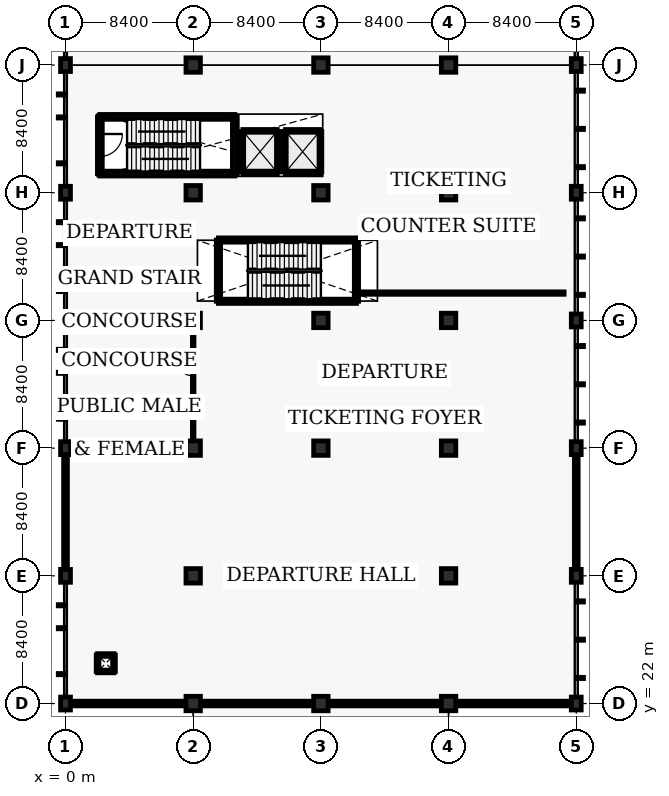
"""IFC4 building model, lengths in metres.
Left out: names, types, materials, properties, quantities, classifications, styles, units other than length and angle.
Written with IfcOpenShell. Run it as: python <this file> out.ifc"""

import sys

from ifc_helpers import new_model, si_unit, direction, frame, frame_2d, origin, origin_2d, place, context, subcontext, project, spatial, rectangle, circle, extrude, element, fill, save


model = new_model("IFC4")
c1 = context("Model", 3, precision=1e-05, world=origin(), true_north=direction((0.0, 1.0)))
c2 = subcontext(c1, "Body", "Model", "MODEL_VIEW")
j1 = project(units=[si_unit("LENGTHUNIT", "METRE"), si_unit("PLANEANGLEUNIT", "RADIAN")], contexts=[c1])
p1 = place(None, origin())
s1 = spatial("IfcSite", under=j1, at=p1, CompositionType="ELEMENT")
p2 = place(p1, origin())
s2 = spatial("IfcBuilding", under=s1, at=p2, CompositionType="ELEMENT")
p3 = place(p2, origin())
s3 = spatial("IfcBuildingStorey", under=s2, at=p3, CompositionType="ELEMENT", Elevation=0.0)
for number, where, z_axis, x_axis in (
    (1, (0.0, 22.0, -0.46), (0.0, 0.0, 1.0), (1.0, 0.0, 0.0)),
    (2, (0.0, 30.4, -0.46), (0.0, 0.0, 1.0), (1.0, 0.0, 0.0)),
    (3, (0.0, 38.8, -0.46), (0.0, 0.0, 1.0), (1.0, 0.0, 0.0)),
    (4, (0.0, 47.2, -0.46), (0.0, 0.0, 1.0), (1.0, 0.0, 0.0)),
    (5, (0.0, 55.6, -0.46), (0.0, 0.0, 1.0), (1.0, 0.0, 0.0)),
    (6, (0.0, 64.0, -0.46), (0.0, 0.0, 1.0), (1.0, 0.0, 0.0)),
):
    element("IfcColumn", number, at=place(p3, frame(where, z_axis=z_axis, x_axis=x_axis)), inside=s3, PredefinedType="COLUMN", context=c2, shape_type="SweptSolid", body=[
        extrude(rectangle(XDim=0.65, YDim=0.85, at=origin_2d()), origin(), (0.0, 0.0, 1.0), 5.9),
    ])
p4 = place(p3, frame((8.4, 22.0, -0.46), z_axis=(0.0, 0.0, 1.0), x_axis=(1.0, 0.0, 0.0)))
e7 = element("IfcColumn", 7, at=p4, inside=s3, PredefinedType="COLUMN", context=c2, shape_type="SweptSolid", body=[
    extrude(circle(Radius=0.475, at=origin_2d()), origin(), (0.0, 0.0, 1.0), 11.339),
])
p5 = place(p3, frame((8.4, 30.4, -0.46), z_axis=(0.0, 0.0, 1.0), x_axis=(1.0, 0.0, 0.0)))
e8 = element("IfcColumn", 8, at=p5, inside=s3, PredefinedType="COLUMN", context=c2, shape_type="SweptSolid", body=[
    extrude(circle(Radius=0.475, at=origin_2d()), origin(), (0.0, 0.0, 1.0), 12.053),
])
p6 = place(p3, frame((8.4, 38.8, -0.46), z_axis=(0.0, 0.0, 1.0), x_axis=(1.0, 0.0, 0.0)))
e9 = element("IfcColumn", 9, at=p6, inside=s3, PredefinedType="COLUMN", context=c2, shape_type="SweptSolid", body=[
    extrude(circle(Radius=0.475, at=origin_2d()), origin(), (0.0, 0.0, 1.0), 12.768),
])
for number, where, z_axis, x_axis in (
    (10, (8.4, 47.2, -0.46), (0.0, 0.0, 1.0), (1.0, 0.0, 0.0)),
    (11, (8.4, 55.6, -0.46), (0.0, 0.0, 1.0), (1.0, 0.0, 0.0)),
    (12, (8.4, 64.0, -0.46), (0.0, 0.0, 1.0), (1.0, 0.0, 0.0)),
):
    element("IfcColumn", number, at=place(p3, frame(where, z_axis=z_axis, x_axis=x_axis)), inside=s3, PredefinedType="COLUMN", context=c2, shape_type="SweptSolid", body=[
        extrude(circle(Radius=0.475, at=origin_2d()), origin(), (0.0, 0.0, 1.0), 5.9),
    ])
p7 = place(p3, frame((16.8, 22.0, -0.46), z_axis=(0.0, 0.0, 1.0), x_axis=(1.0, 0.0, 0.0)))
e13 = element("IfcColumn", 13, at=p7, inside=s3, PredefinedType="COLUMN", context=c2, shape_type="SweptSolid", body=[
    extrude(circle(Radius=0.475, at=origin_2d()), origin(), (0.0, 0.0, 1.0), 13.817),
])
p8 = place(p3, frame((16.8, 30.4, -0.46), z_axis=(0.0, 0.0, 1.0), x_axis=(1.0, 0.0, 0.0)))
e14 = element("IfcColumn", 14, at=p8, inside=s3, PredefinedType="COLUMN", context=c2, shape_type="SweptSolid", body=[
    extrude(circle(Radius=0.475, at=origin_2d()), origin(), (0.0, 0.0, 1.0), 14.531),
])
p9 = place(p3, frame((16.8, 38.8, -0.46), z_axis=(0.0, 0.0, 1.0), x_axis=(1.0, 0.0, 0.0)))
e15 = element("IfcColumn", 15, at=p9, inside=s3, PredefinedType="COLUMN", context=c2, shape_type="SweptSolid", body=[
    extrude(circle(Radius=0.475, at=origin_2d()), origin(), (0.0, 0.0, 1.0), 15.246),
])
for number, where, z_axis, x_axis in (
    (16, (16.8, 47.2, -0.46), (0.0, 0.0, 1.0), (1.0, 0.0, 0.0)),
    (17, (16.8, 55.6, -0.46), (0.0, 0.0, 1.0), (1.0, 0.0, 0.0)),
    (18, (16.8, 64.0, -0.46), (0.0, 0.0, 1.0), (1.0, 0.0, 0.0)),
):
    element("IfcColumn", number, at=place(p3, frame(where, z_axis=z_axis, x_axis=x_axis)), inside=s3, PredefinedType="COLUMN", context=c2, shape_type="SweptSolid", body=[
        extrude(circle(Radius=0.475, at=origin_2d()), origin(), (0.0, 0.0, 1.0), 5.9),
    ])
p10 = place(p3, frame((25.2, 22.0, -0.46), z_axis=(0.0, 0.0, 1.0), x_axis=(1.0, 0.0, 0.0)))
e19 = element("IfcColumn", 19, at=p10, inside=s3, PredefinedType="COLUMN", context=c2, shape_type="SweptSolid", body=[
    extrude(circle(Radius=0.475, at=origin_2d()), origin(), (0.0, 0.0, 1.0), 11.339),
])
p11 = place(p3, frame((25.2, 30.4, -0.46), z_axis=(0.0, 0.0, 1.0), x_axis=(1.0, 0.0, 0.0)))
e20 = element("IfcColumn", 20, at=p11, inside=s3, PredefinedType="COLUMN", context=c2, shape_type="SweptSolid", body=[
    extrude(circle(Radius=0.475, at=origin_2d()), origin(), (0.0, 0.0, 1.0), 12.053),
])
p12 = place(p3, frame((25.2, 38.8, -0.46), z_axis=(0.0, 0.0, 1.0), x_axis=(1.0, 0.0, 0.0)))
e21 = element("IfcColumn", 21, at=p12, inside=s3, PredefinedType="COLUMN", context=c2, shape_type="SweptSolid", body=[
    extrude(circle(Radius=0.475, at=origin_2d()), origin(), (0.0, 0.0, 1.0), 12.768),
])
for number, where, z_axis, x_axis in (
    (22, (25.2, 47.2, -0.46), (0.0, 0.0, 1.0), (1.0, 0.0, 0.0)),
    (23, (25.2, 55.6, -0.46), (0.0, 0.0, 1.0), (1.0, 0.0, 0.0)),
    (24, (25.2, 64.0, -0.46), (0.0, 0.0, 1.0), (1.0, 0.0, 0.0)),
):
    element("IfcColumn", number, at=place(p3, frame(where, z_axis=z_axis, x_axis=x_axis)), inside=s3, PredefinedType="COLUMN", context=c2, shape_type="SweptSolid", body=[
        extrude(circle(Radius=0.475, at=origin_2d()), origin(), (0.0, 0.0, 1.0), 5.9),
    ])
for number, where, z_axis, x_axis in (
    (25, (33.6, 22.0, -0.46), (0.0, 0.0, 1.0), (1.0, 0.0, 0.0)),
    (26, (33.6, 30.4, -0.46), (0.0, 0.0, 1.0), (1.0, 0.0, 0.0)),
    (27, (33.6, 38.8, -0.46), (0.0, 0.0, 1.0), (1.0, 0.0, 0.0)),
    (28, (33.6, 47.2, -0.46), (0.0, 0.0, 1.0), (1.0, 0.0, 0.0)),
    (29, (33.6, 55.6, -0.46), (0.0, 0.0, 1.0), (1.0, 0.0, 0.0)),
    (30, (33.6, 64.0, -0.46), (0.0, 0.0, 1.0), (1.0, 0.0, 0.0)),
):
    element("IfcColumn", number, at=place(p3, frame(where, z_axis=z_axis, x_axis=x_axis)), inside=s3, PredefinedType="COLUMN", context=c2, shape_type="SweptSolid", body=[
        extrude(rectangle(XDim=0.65, YDim=0.85, at=origin_2d()), origin(), (0.0, 0.0, 1.0), 5.9),
    ])
p13 = place(p3, frame((0.325, 22.0, 0.0), z_axis=(0.0, 0.0, 1.0), x_axis=(1.0, 0.0, 0.0)))
e31 = element("IfcWall", 31, at=p13, inside=s3, PredefinedType="SOLIDWALL", context=c2, shape_type="SweptSolid", body=[
    extrude(rectangle(XDim=7.6, YDim=0.31, at=frame_2d((3.8, 0.0))), origin(), (0.0, 0.0, 1.0), 3.85),
])
p14 = place(p13, frame((2.765, 0.0, 0.0)))
e32 = element("IfcOpeningElement", 32, at=p14, cuts=e31, PredefinedType="OPENING", context=c2, shape_type="SweptSolid", body=[
    extrude(rectangle(XDim=2.2, YDim=2.35, at=frame_2d((1.1, 1.175))), frame((0.0, 0.165, 0.0), z_axis=(0.0, -1.0, 0.0), x_axis=(1.0, 0.0, 0.0)), (0.0, 0.0, 1.0), 0.33),
])
p15 = place(p3, frame((8.875, 22.0, 0.0), z_axis=(0.0, 0.0, 1.0), x_axis=(1.0, 0.0, 0.0)))
e33 = element("IfcWall", 33, at=p15, inside=s3, PredefinedType="SOLIDWALL", context=c2, shape_type="SweptSolid", body=[
    extrude(rectangle(XDim=7.45, YDim=0.31, at=frame_2d((3.725, 0.0))), origin(), (0.0, 0.0, 1.0), 3.85),
])
p16 = place(p15, frame((2.615, 0.0, 0.0)))
e34 = element("IfcOpeningElement", 34, at=p16, cuts=e33, PredefinedType="OPENING", context=c2, shape_type="SweptSolid", body=[
    extrude(rectangle(XDim=2.4, YDim=2.35, at=frame_2d((1.2, 1.175))), frame((0.0, 0.165, 0.0), z_axis=(0.0, -1.0, 0.0), x_axis=(1.0, 0.0, 0.0)), (0.0, 0.0, 1.0), 0.33),
])
p17 = place(p3, frame((17.275, 22.0, 0.0), z_axis=(0.0, 0.0, 1.0), x_axis=(1.0, 0.0, 0.0)))
e35 = element("IfcWall", 35, at=p17, inside=s3, PredefinedType="SOLIDWALL", context=c2, shape_type="SweptSolid", body=[
    extrude(rectangle(XDim=7.45, YDim=0.31, at=frame_2d((3.725, 0.0))), origin(), (0.0, 0.0, 1.0), 3.85),
])
p18 = place(p17, frame((2.615, 0.0, 0.0)))
e36 = element("IfcOpeningElement", 36, at=p18, cuts=e35, PredefinedType="OPENING", context=c2, shape_type="SweptSolid", body=[
    extrude(rectangle(XDim=2.4, YDim=2.35, at=frame_2d((1.2, 1.175))), frame((0.0, 0.165, 0.0), z_axis=(0.0, -1.0, 0.0), x_axis=(1.0, 0.0, 0.0)), (0.0, 0.0, 1.0), 0.33),
])
p19 = place(p3, frame((25.675, 22.0, 0.0), z_axis=(0.0, 0.0, 1.0), x_axis=(1.0, 0.0, 0.0)))
e37 = element("IfcWall", 37, at=p19, inside=s3, PredefinedType="SOLIDWALL", context=c2, shape_type="SweptSolid", body=[
    extrude(rectangle(XDim=7.6, YDim=0.31, at=frame_2d((3.8, 0.0))), origin(), (0.0, 0.0, 1.0), 3.85),
])
p20 = place(p19, frame((2.615, 0.0, 0.0)))
e38 = element("IfcOpeningElement", 38, at=p20, cuts=e37, PredefinedType="OPENING", context=c2, shape_type="SweptSolid", body=[
    extrude(rectangle(XDim=2.2, YDim=2.35, at=frame_2d((1.1, 1.175))), frame((0.0, 0.165, 0.0), z_axis=(0.0, -1.0, 0.0), x_axis=(1.0, 0.0, 0.0)), (0.0, 0.0, 1.0), 0.33),
])
for number, where, z_axis, x_axis in (
    (39, (0.0, 38.375, 0.0), (0.0, 0.0, 1.0), (0.0, -1.0, 0.0)),
    (40, (33.6, 30.825, 0.0), (0.0, 0.0, 1.0), (0.0, 1.0, 0.0)),
):
    element("IfcWall", number, at=place(p3, frame(where, z_axis=z_axis, x_axis=x_axis)), inside=s3, PredefinedType="SOLIDWALL", context=c2, shape_type="SweptSolid", body=[
        extrude(rectangle(XDim=7.55, YDim=0.25, at=frame_2d((3.775, 0.0))), origin(), (0.0, 0.0, 1.0), 4.94),
    ])
for number, where, z_axis, x_axis in (
    (41, (2.26, 56.86, 0.0), (0.0, 0.0, 1.0), (1.0, 0.0, 0.0)),
    (42, (2.26, 60.59, 0.0), (0.0, 0.0, 1.0), (1.0, 0.0, 0.0)),
):
    element("IfcWall", number, at=place(p3, frame(where, z_axis=z_axis, x_axis=x_axis)), inside=s3, PredefinedType="SHEAR", context=c2, shape_type="SweptSolid", body=[
        extrude(rectangle(XDim=8.88, YDim=0.32, at=frame_2d((4.44, 0.0))), origin(), (0.0, 0.0, 1.0), 5.44),
    ])
p21 = place(p3, frame((2.26, 60.59, 0.0), z_axis=(0.0, 0.0, 1.0), x_axis=(0.0, -1.0, 0.0)))
e43 = element("IfcWall", 43, at=p21, inside=s3, PredefinedType="SHEAR", context=c2, shape_type="SweptSolid", body=[
    extrude(rectangle(XDim=3.73, YDim=0.32, at=frame_2d((1.865, 0.0))), origin(), (0.0, 0.0, 1.0), 5.44),
])
p22 = place(p21, frame((1.125, 0.0, 0.0)))
e44 = element("IfcOpeningElement", 44, at=p22, cuts=e43, PredefinedType="OPENING", context=c2, shape_type="SweptSolid", body=[
    extrude(rectangle(XDim=1.48, YDim=2.15, at=frame_2d((0.74, 1.075))), frame((0.0, 0.17, 0.0), z_axis=(0.0, -1.0, 0.0), x_axis=(1.0, 0.0, 0.0)), (0.0, 0.0, 1.0), 0.34),
])
p23 = place(p3, frame((11.14, 56.86, 0.0), z_axis=(0.0, 0.0, 1.0), x_axis=(0.0, 1.0, 0.0)))
e45 = element("IfcWall", 45, at=p23, inside=s3, PredefinedType="SHEAR", context=c2, shape_type="SweptSolid", body=[
    extrude(rectangle(XDim=3.73, YDim=0.32, at=frame_2d((1.865, 0.0))), origin(), (0.0, 0.0, 1.0), 5.44),
])
p24 = place(p3, frame((11.67, 56.97, 0.0), z_axis=(0.0, 0.0, 1.0), x_axis=(1.0, 0.0, 0.0)))
e46 = element("IfcWall", 46, at=p24, inside=s3, PredefinedType="SHEAR", context=c2, shape_type="SweptSolid", body=[
    extrude(rectangle(XDim=2.26, YDim=0.26, at=frame_2d((1.13, 0.0))), origin(), (0.0, 0.0, 1.0), 5.44),
])
for number, where, z_axis, x_axis in (
    (47, (13.93, 56.97, 0.0), (0.0, 0.0, 1.0), (0.0, 1.0, 0.0)),
    (48, (11.67, 59.63, 0.0), (0.0, 0.0, 1.0), (0.0, -1.0, 0.0)),
):
    element("IfcWall", number, at=place(p3, frame(where, z_axis=z_axis, x_axis=x_axis)), inside=s3, PredefinedType="SHEAR", context=c2, shape_type="SweptSolid", body=[
        extrude(rectangle(XDim=2.66, YDim=0.26, at=frame_2d((1.33, 0.0))), origin(), (0.0, 0.0, 1.0), 5.44),
    ])
p25 = place(p3, frame((11.67, 59.63, 0.0), z_axis=(0.0, 0.0, 1.0), x_axis=(1.0, 0.0, 0.0)))
e49 = element("IfcWall", 49, at=p25, inside=s3, PredefinedType="SHEAR", context=c2, shape_type="SweptSolid", body=[
    extrude(rectangle(XDim=2.26, YDim=0.26, at=frame_2d((1.13, 0.0))), origin(), (0.0, 0.0, 1.0), 5.44),
])
p26 = place(p25, frame((0.51, 0.0, 0.0)))
e50 = element("IfcOpeningElement", 50, at=p26, cuts=e49, PredefinedType="OPENING", context=c2, shape_type="SweptSolid", body=[
    extrude(rectangle(XDim=1.24, YDim=2.14, at=frame_2d((0.62, 1.07))), frame((0.0, 0.14, 0.0), z_axis=(0.0, -1.0, 0.0), x_axis=(1.0, 0.0, 0.0)), (0.0, 0.0, 1.0), 0.28),
])
p27 = place(p3, frame((14.47, 56.97, 0.0), z_axis=(0.0, 0.0, 1.0), x_axis=(1.0, 0.0, 0.0)))
e51 = element("IfcWall", 51, at=p27, inside=s3, PredefinedType="SHEAR", context=c2, shape_type="SweptSolid", body=[
    extrude(rectangle(XDim=2.26, YDim=0.26, at=frame_2d((1.13, 0.0))), origin(), (0.0, 0.0, 1.0), 5.44),
])
for number, where, z_axis, x_axis in (
    (52, (16.73, 56.97, 0.0), (0.0, 0.0, 1.0), (0.0, 1.0, 0.0)),
    (53, (14.47, 59.63, 0.0), (0.0, 0.0, 1.0), (0.0, -1.0, 0.0)),
):
    element("IfcWall", number, at=place(p3, frame(where, z_axis=z_axis, x_axis=x_axis)), inside=s3, PredefinedType="SHEAR", context=c2, shape_type="SweptSolid", body=[
        extrude(rectangle(XDim=2.66, YDim=0.26, at=frame_2d((1.33, 0.0))), origin(), (0.0, 0.0, 1.0), 5.44),
    ])
p28 = place(p3, frame((14.47, 59.63, 0.0), z_axis=(0.0, 0.0, 1.0), x_axis=(1.0, 0.0, 0.0)))
e54 = element("IfcWall", 54, at=p28, inside=s3, PredefinedType="SHEAR", context=c2, shape_type="SweptSolid", body=[
    extrude(rectangle(XDim=2.26, YDim=0.26, at=frame_2d((1.13, 0.0))), origin(), (0.0, 0.0, 1.0), 5.44),
])
p29 = place(p28, frame((0.51, 0.0, 0.0)))
e55 = element("IfcOpeningElement", 55, at=p29, cuts=e54, PredefinedType="OPENING", context=c2, shape_type="SweptSolid", body=[
    extrude(rectangle(XDim=1.24, YDim=2.14, at=frame_2d((0.62, 1.07))), frame((0.0, 0.14, 0.0), z_axis=(0.0, -1.0, 0.0), x_axis=(1.0, 0.0, 0.0)), (0.0, 0.0, 1.0), 0.28),
])
for number, where, z_axis, x_axis in (
    (56, (10.06, 48.46, 0.0), (0.0, 0.0, 1.0), (1.0, 0.0, 0.0)),
    (57, (10.06, 52.49, 0.0), (0.0, 0.0, 1.0), (1.0, 0.0, 0.0)),
):
    element("IfcWall", number, at=place(p3, frame(where, z_axis=z_axis, x_axis=x_axis)), inside=s3, PredefinedType="SHEAR", context=c2, shape_type="SweptSolid", body=[
        extrude(rectangle(XDim=9.08, YDim=0.28, at=frame_2d((4.54, 0.0))), origin(), (0.0, 0.0, 1.0), 5.44),
    ])
p30 = place(p3, frame((10.06, 52.49, 0.0), z_axis=(0.0, 0.0, 1.0), x_axis=(0.0, -1.0, 0.0)))
e58 = element("IfcWall", 58, at=p30, inside=s3, PredefinedType="SHEAR", context=c2, shape_type="SweptSolid", body=[
    extrude(rectangle(XDim=4.03, YDim=0.28, at=frame_2d((2.015, 0.0))), origin(), (0.0, 0.0, 1.0), 5.44),
])
p31 = place(p30, frame((1.035, 0.0, 0.0)))
e59 = element("IfcOpeningElement", 59, at=p31, cuts=e58, PredefinedType="OPENING", context=c2, shape_type="SweptSolid", body=[
    extrude(rectangle(XDim=1.96, YDim=2.22, at=frame_2d((0.98, 1.11))), frame((0.0, 0.15, 0.0), z_axis=(0.0, -1.0, 0.0), x_axis=(1.0, 0.0, 0.0)), (0.0, 0.0, 1.0), 0.3),
])
p32 = place(p3, frame((19.14, 48.46, 0.0), z_axis=(0.0, 0.0, 1.0), x_axis=(0.0, 1.0, 0.0)))
e60 = element("IfcWall", 60, at=p32, inside=s3, PredefinedType="SHEAR", context=c2, shape_type="SweptSolid", body=[
    extrude(rectangle(XDim=4.03, YDim=0.28, at=frame_2d((2.015, 0.0))), origin(), (0.0, 0.0, 1.0), 5.44),
])
for number, where, z_axis, x_axis in (
    (61, (2.11, 24.11, 0.0), (0.0, 0.0, 1.0), (1.0, 0.0, 0.0)),
    (62, (3.19, 24.11, 0.0), (0.0, 0.0, 1.0), (0.0, 1.0, 0.0)),
    (63, (3.19, 25.19, 0.0), (0.0, 0.0, 1.0), (-1.0, 0.0, 0.0)),
    (64, (2.11, 25.19, 0.0), (0.0, 0.0, 1.0), (0.0, -1.0, 0.0)),
):
    element("IfcWall", number, at=place(p3, frame(where, z_axis=z_axis, x_axis=x_axis)), inside=s3, PredefinedType="SOLIDWALL", context=c2, shape_type="SweptSolid", body=[
        extrude(rectangle(XDim=1.08, YDim=0.18, at=frame_2d((0.54, 0.0))), origin(), (0.0, 0.0, 1.0), 2.6),
    ])
p33 = place(p3, frame((19.0, 49.0, 0.0), z_axis=(0.0, 0.0, 1.0), x_axis=(1.0, 0.0, 0.0)))
e65 = element("IfcWall", 65, at=p33, inside=s3, PredefinedType="PARTITIONING", context=c2, shape_type="SweptSolid", body=[
    extrude(rectangle(XDim=13.8, YDim=0.16, at=frame_2d((6.9, 0.0))), origin(), (0.0, 0.0, 1.0), 3.1),
])
p34 = place(p33, frame((2.4, 0.0, 0.0)))
e66 = element("IfcOpeningElement", 66, at=p34, cuts=e65, PredefinedType="OPENING", context=c2, shape_type="SweptSolid", body=[
    extrude(rectangle(XDim=2.1, YDim=2.22, at=frame_2d((1.05, 1.11))), frame((0.0, 0.09, 0.0), z_axis=(0.0, -1.0, 0.0), x_axis=(1.0, 0.0, 0.0)), (0.0, 0.0, 1.0), 0.18),
])
for number, where, z_axis, x_axis in (
    (67, (0.65, 38.8, 0.0), (0.0, 0.0, 1.0), (1.0, 0.0, 0.0)),
    (68, (0.65, 47.2, 0.0), (0.0, 0.0, 1.0), (1.0, 0.0, 0.0)),
):
    element("IfcWall", number, at=place(p3, frame(where, z_axis=z_axis, x_axis=x_axis)), inside=s3, PredefinedType="PARTITIONING", context=c2, shape_type="SweptSolid", body=[
        extrude(rectangle(XDim=7.1, YDim=0.1, at=frame_2d((3.55, 0.0))), origin(), (0.0, 0.0, 1.0), 3.0),
    ])
p35 = place(p3, frame((8.4, 39.45, 0.0), z_axis=(0.0, 0.0, 1.0), x_axis=(0.0, 1.0, 0.0)))
e69 = element("IfcWall", 69, at=p35, inside=s3, PredefinedType="PARTITIONING", context=c2, shape_type="SweptSolid", body=[
    extrude(rectangle(XDim=7.1, YDim=0.1, at=frame_2d((3.55, 0.0))), origin(), (0.0, 0.0, 1.0), 3.0),
])
p36 = place(p35, frame((1.5, 0.0, 0.0)))
e70 = element("IfcOpeningElement", 70, at=p36, cuts=e69, PredefinedType="OPENING", context=c2, shape_type="SweptSolid", body=[
    extrude(rectangle(XDim=0.9, YDim=2.06, at=frame_2d((0.45, 1.03))), frame((0.0, 0.06, 0.0), z_axis=(0.0, -1.0, 0.0), x_axis=(1.0, 0.0, 0.0)), (0.0, 0.0, 1.0), 0.12),
])
p37 = place(p35, frame((4.1, 0.0, 0.0)))
e71 = element("IfcOpeningElement", 71, at=p37, cuts=e69, PredefinedType="OPENING", context=c2, shape_type="SweptSolid", body=[
    extrude(rectangle(XDim=1.06, YDim=2.1, at=frame_2d((0.53, 1.05))), frame((0.0, 0.06, 0.0), z_axis=(0.0, -1.0, 0.0), x_axis=(1.0, 0.0, 0.0)), (0.0, 0.0, 1.0), 0.12),
])
p38 = place(p14, origin())
e72 = element("IfcDoor", 72, at=p38, inside=s3, OperationType="DOUBLE_DOOR_SLIDING", PredefinedType="DOOR", context=c2, shape_type="SweptSolid", body=[
    extrude(rectangle(XDim=2.2, YDim=2.35, at=frame_2d((1.1, 1.175))), frame((0.0, 0.025, 0.0), z_axis=(0.0, -1.0, 0.0), x_axis=(1.0, 0.0, 0.0)), (0.0, 0.0, 1.0), 0.05),
])
fill(e32, e72)
p39 = place(p16, origin())
e73 = element("IfcDoor", 73, at=p39, inside=s3, OperationType="DOUBLE_DOOR_SLIDING", PredefinedType="DOOR", context=c2, shape_type="SweptSolid", body=[
    extrude(rectangle(XDim=2.4, YDim=2.35, at=frame_2d((1.2, 1.175))), frame((0.0, 0.025, 0.0), z_axis=(0.0, -1.0, 0.0), x_axis=(1.0, 0.0, 0.0)), (0.0, 0.0, 1.0), 0.05),
])
fill(e34, e73)
p40 = place(p18, origin())
e74 = element("IfcDoor", 74, at=p40, inside=s3, OperationType="DOUBLE_DOOR_SLIDING", PredefinedType="DOOR", context=c2, shape_type="SweptSolid", body=[
    extrude(rectangle(XDim=2.4, YDim=2.35, at=frame_2d((1.2, 1.175))), frame((0.0, 0.025, 0.0), z_axis=(0.0, -1.0, 0.0), x_axis=(1.0, 0.0, 0.0)), (0.0, 0.0, 1.0), 0.05),
])
fill(e36, e74)
p41 = place(p20, origin())
e75 = element("IfcDoor", 75, at=p41, inside=s3, OperationType="DOUBLE_DOOR_SLIDING", PredefinedType="DOOR", context=c2, shape_type="SweptSolid", body=[
    extrude(rectangle(XDim=2.2, YDim=2.35, at=frame_2d((1.1, 1.175))), frame((0.0, 0.025, 0.0), z_axis=(0.0, -1.0, 0.0), x_axis=(1.0, 0.0, 0.0)), (0.0, 0.0, 1.0), 0.05),
])
fill(e38, e75)
p42 = place(p22, origin())
e76 = element("IfcDoor", 76, at=p42, inside=s3, OperationType="SINGLE_SWING_LEFT", PredefinedType="DOOR", context=c2, shape_type="SweptSolid", body=[
    extrude(rectangle(XDim=1.48, YDim=2.15, at=frame_2d((0.74, 1.075))), frame((0.0, 0.025, 0.0), z_axis=(0.0, -1.0, 0.0), x_axis=(1.0, 0.0, 0.0)), (0.0, 0.0, 1.0), 0.05),
])
fill(e44, e76)
p43 = place(p26, origin())
e77 = element("IfcDoor", 77, at=p43, inside=s3, OperationType="DOUBLE_DOOR_SLIDING", PredefinedType="DOOR", context=c2, shape_type="SweptSolid", body=[
    extrude(rectangle(XDim=1.24, YDim=2.14, at=frame_2d((0.62, 1.07))), frame((0.0, 0.025, 0.0), z_axis=(0.0, -1.0, 0.0), x_axis=(1.0, 0.0, 0.0)), (0.0, 0.0, 1.0), 0.05),
])
fill(e50, e77)
p44 = place(p29, origin())
e78 = element("IfcDoor", 78, at=p44, inside=s3, OperationType="DOUBLE_DOOR_SLIDING", PredefinedType="DOOR", context=c2, shape_type="SweptSolid", body=[
    extrude(rectangle(XDim=1.24, YDim=2.14, at=frame_2d((0.62, 1.07))), frame((0.0, 0.025, 0.0), z_axis=(0.0, -1.0, 0.0), x_axis=(1.0, 0.0, 0.0)), (0.0, 0.0, 1.0), 0.05),
])
fill(e55, e78)
p45 = place(p31, origin())
e79 = element("IfcDoor", 79, at=p45, inside=s3, OperationType="DOUBLE_DOOR_SLIDING", PredefinedType="DOOR", context=c2, shape_type="SweptSolid", body=[
    extrude(rectangle(XDim=1.96, YDim=2.22, at=frame_2d((0.98, 1.11))), frame((0.0, 0.025, 0.0), z_axis=(0.0, -1.0, 0.0), x_axis=(1.0, 0.0, 0.0)), (0.0, 0.0, 1.0), 0.05),
])
fill(e59, e79)
p46 = place(p34, origin())
e80 = element("IfcDoor", 80, at=p46, inside=s3, OperationType="DOUBLE_DOOR_SLIDING", PredefinedType="DOOR", context=c2, shape_type="SweptSolid", body=[
    extrude(rectangle(XDim=2.1, YDim=2.22, at=frame_2d((1.05, 1.11))), frame((0.0, 0.025, 0.0), z_axis=(0.0, -1.0, 0.0), x_axis=(1.0, 0.0, 0.0)), (0.0, 0.0, 1.0), 0.05),
])
fill(e66, e80)
p47 = place(p36, origin())
e81 = element("IfcDoor", 81, at=p47, inside=s3, OperationType="SINGLE_SWING_LEFT", PredefinedType="DOOR", context=c2, shape_type="SweptSolid", body=[
    extrude(rectangle(XDim=0.9, YDim=2.06, at=frame_2d((0.45, 1.03))), frame((0.0, 0.025, 0.0), z_axis=(0.0, -1.0, 0.0), x_axis=(1.0, 0.0, 0.0)), (0.0, 0.0, 1.0), 0.05),
])
fill(e70, e81)
p48 = place(p37, origin())
e82 = element("IfcDoor", 82, at=p48, inside=s3, OperationType="SINGLE_SWING_RIGHT", PredefinedType="DOOR", context=c2, shape_type="SweptSolid", body=[
    extrude(rectangle(XDim=1.06, YDim=2.1, at=frame_2d((0.53, 1.05))), frame((0.0, 0.025, 0.0), z_axis=(0.0, -1.0, 0.0), x_axis=(1.0, 0.0, 0.0)), (0.0, 0.0, 1.0), 0.05),
])
fill(e71, e82)
save(model, sys.argv[1])
